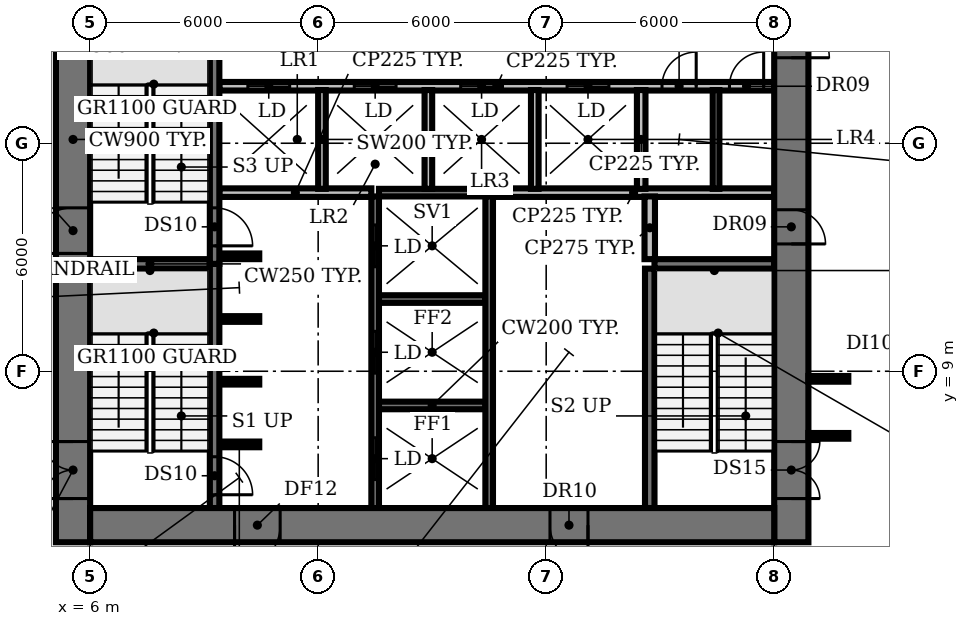
"""IFC4 building model, lengths in metres.
Left out: names, types, materials, properties, quantities, classifications, styles, units other than length and angle.
Written with IfcOpenShell. Run it as: python <this file> out.ifc"""

import sys

from ifc_helpers import new_model, si_unit, direction, frame, frame_2d, origin, place, context, subcontext, project, spatial, rectangle, extrude, element, fill, save


model = new_model("IFC4")
c1 = context("Model", 3, precision=1e-05, world=origin(), true_north=direction((0.0, 1.0)))
c2 = subcontext(c1, "Body", "Model", "MODEL_VIEW")
j1 = project(units=[si_unit("LENGTHUNIT", "METRE"), si_unit("PLANEANGLEUNIT", "RADIAN")], contexts=[c1])
p1 = place(None, origin())
s1 = spatial("IfcSite", under=j1, at=p1, CompositionType="ELEMENT")
p2 = place(p1, origin())
s2 = spatial("IfcBuilding", under=s1, at=p2, CompositionType="ELEMENT")
p3 = place(p2, frame((0.0, 0.0, 54.2)))
s3 = spatial("IfcBuildingStorey", under=s2, at=p3, CompositionType="ELEMENT", Elevation=54.2)
p4 = place(p3, frame((9.4, 7.075, 0.0), z_axis=(0.0, 0.0, 1.0), x_axis=(1.0, 0.0, 0.0)))
e1 = element("IfcWall", 1, at=p4, inside=s3, PredefinedType="SHEAR", context=c2, shape_type="SweptSolid", body=[
    extrude(rectangle(XDim=1.05, YDim=0.15, at=frame_2d((0.525, 0.0))), origin(), (0.0, 0.0, 1.0), 3.85),
])
p5 = place(p3, frame((13.6, 8.1, 0.0), z_axis=(0.0, 0.0, 1.0), x_axis=(1.0, 0.0, 0.0)))
e2 = element("IfcWall", 2, at=p5, inside=s3, PredefinedType="SHEAR", context=c2, shape_type="SweptSolid", body=[
    extrude(rectangle(XDim=2.8, YDim=0.2, at=frame_2d((1.4, 0.0))), origin(), (0.0, 0.0, 1.0), 3.85),
])
for number, where, z_axis, x_axis in (
    (3, (9.4, 8.725, 0.0), (0.0, 0.0, 1.0), (1.0, 0.0, 0.0)),
    (4, (9.4, 10.375, 0.0), (0.0, 0.0, 1.0), (1.0, 0.0, 0.0)),
):
    element("IfcWall", number, at=place(p3, frame(where, z_axis=z_axis, x_axis=x_axis)), inside=s3, PredefinedType="SHEAR", context=c2, shape_type="SweptSolid", body=[
        extrude(rectangle(XDim=1.05, YDim=0.15, at=frame_2d((0.525, 0.0))), origin(), (0.0, 0.0, 1.0), 3.85),
    ])
p6 = place(p3, frame((13.6, 10.9, 0.0), z_axis=(0.0, 0.0, 1.0), x_axis=(1.0, 0.0, 0.0)))
e5 = element("IfcWall", 5, at=p6, inside=s3, PredefinedType="SHEAR", context=c2, shape_type="SweptSolid", body=[
    extrude(rectangle(XDim=2.8, YDim=0.2, at=frame_2d((1.4, 0.0))), origin(), (0.0, 0.0, 1.0), 3.85),
])
for number, where, z_axis, x_axis in (
    (6, (6.0, 11.825, 0.0), (0.0, 0.0, 1.0), (1.0, 0.0, 0.0)),
    (7, (20.85, 11.825, 0.0), (0.0, 0.0, 1.0), (1.0, 0.0, 0.0)),
):
    element("IfcWall", number, at=place(p3, frame(where, z_axis=z_axis, x_axis=x_axis)), inside=s3, PredefinedType="SHEAR", context=c2, shape_type="SweptSolid", body=[
        extrude(rectangle(XDim=3.15, YDim=0.25, at=frame_2d((1.575, 0.0))), origin(), (0.0, 0.0, 1.0), 3.85),
    ])
p7 = place(p3, frame((9.4, 12.025, 0.0), z_axis=(0.0, 0.0, 1.0), x_axis=(1.0, 0.0, 0.0)))
e8 = element("IfcWall", 8, at=p7, inside=s3, PredefinedType="SHEAR", context=c2, shape_type="SweptSolid", body=[
    extrude(rectangle(XDim=1.05, YDim=0.15, at=frame_2d((0.525, 0.0))), origin(), (0.0, 0.0, 1.0), 3.85),
])
p8 = place(p3, frame((9.4, 13.7, 0.0), z_axis=(0.0, 0.0, 1.0), x_axis=(1.0, 0.0, 0.0)))
e9 = element("IfcWall", 9, at=p8, inside=s3, PredefinedType="PARTITIONING", context=c2, shape_type="SweptSolid", body=[
    extrude(rectangle(XDim=4.0, YDim=0.225, at=frame_2d((2.0, 0.0))), origin(), (0.0, 0.0, 1.0), 3.85),
])
p9 = place(p3, frame((13.6, 13.7, 0.0), z_axis=(0.0, 0.0, 1.0), x_axis=(1.0, 0.0, 0.0)))
e10 = element("IfcWall", 10, at=p9, inside=s3, PredefinedType="SHEAR", context=c2, shape_type="SweptSolid", body=[
    extrude(rectangle(XDim=2.8, YDim=0.2, at=frame_2d((1.4, 0.0))), origin(), (0.0, 0.0, 1.0), 3.85),
])
p10 = place(p3, frame((16.6, 13.7, 0.0), z_axis=(0.0, 0.0, 1.0), x_axis=(1.0, 0.0, 0.0)))
e11 = element("IfcWall", 11, at=p10, inside=s3, PredefinedType="PARTITIONING", context=c2, shape_type="SweptSolid", body=[
    extrude(rectangle(XDim=7.4, YDim=0.225, at=frame_2d((3.7, 0.0))), origin(), (0.0, 0.0, 1.0), 3.85),
])
p11 = place(p3, frame((9.4, 16.5, 0.0), z_axis=(0.0, 0.0, 1.0), x_axis=(1.0, 0.0, 0.0)))
e12 = element("IfcWall", 12, at=p11, inside=s3, PredefinedType="PARTITIONING", context=c2, shape_type="SweptSolid", body=[
    extrude(rectangle(XDim=14.6, YDim=0.225, at=frame_2d((7.3, 0.0))), origin(), (0.0, 0.0, 1.0), 3.85),
])
p12 = place(p11, frame((0.75, 0.0, 0.0)))
e13 = element("IfcOpeningElement", 13, at=p12, cuts=e12, PredefinedType="OPENING", context=c2, shape_type="SweptSolid", body=[
    extrude(rectangle(XDim=1.1, YDim=2.1, at=frame_2d((0.55, 1.05))), frame((0.0, 0.123, 0.0), z_axis=(0.0, -1.0, 0.0), x_axis=(1.0, 0.0, 0.0)), (0.0, 0.0, 1.0), 0.245),
])
p13 = place(p11, frame((3.55, 0.0, 0.0)))
e14 = element("IfcOpeningElement", 14, at=p13, cuts=e12, PredefinedType="OPENING", context=c2, shape_type="SweptSolid", body=[
    extrude(rectangle(XDim=1.1, YDim=2.1, at=frame_2d((0.55, 1.05))), frame((0.0, 0.123, 0.0), z_axis=(0.0, -1.0, 0.0), x_axis=(1.0, 0.0, 0.0)), (0.0, 0.0, 1.0), 0.245),
])
p14 = place(p11, frame((6.35, 0.0, 0.0)))
e15 = element("IfcOpeningElement", 15, at=p14, cuts=e12, PredefinedType="OPENING", context=c2, shape_type="SweptSolid", body=[
    extrude(rectangle(XDim=1.1, YDim=2.1, at=frame_2d((0.55, 1.05))), frame((0.0, 0.123, 0.0), z_axis=(0.0, -1.0, 0.0), x_axis=(1.0, 0.0, 0.0)), (0.0, 0.0, 1.0), 0.245),
])
p15 = place(p11, frame((9.15, 0.0, 0.0)))
e16 = element("IfcOpeningElement", 16, at=p15, cuts=e12, PredefinedType="OPENING", context=c2, shape_type="SweptSolid", body=[
    extrude(rectangle(XDim=1.1, YDim=2.1, at=frame_2d((0.55, 1.05))), frame((0.0, 0.123, 0.0), z_axis=(0.0, -1.0, 0.0), x_axis=(1.0, 0.0, 0.0)), (0.0, 0.0, 1.0), 0.245),
])
p16 = place(p11, frame((11.647, 0.0, 0.0)))
e17 = element("IfcOpeningElement", 17, at=p16, cuts=e12, PredefinedType="OPENING", context=c2, shape_type="SweptSolid", body=[
    extrude(rectangle(XDim=0.9, YDim=2.1, at=frame_2d((0.45, 1.05))), frame((0.0, 0.123, 0.0), z_axis=(0.0, -1.0, 0.0), x_axis=(1.0, 0.0, 0.0)), (0.0, 0.0, 1.0), 0.245),
])
p17 = place(p11, frame((13.423, 0.0, 0.0)))
e18 = element("IfcOpeningElement", 18, at=p17, cuts=e12, PredefinedType="OPENING", context=c2, shape_type="SweptSolid", body=[
    extrude(rectangle(XDim=0.9, YDim=2.1, at=frame_2d((0.45, 1.05))), frame((0.0, 0.123, 0.0), z_axis=(0.0, -1.0, 0.0), x_axis=(1.0, 0.0, 0.0)), (0.0, 0.0, 1.0), 0.245),
])
p18 = place(p3, frame((9.275, 11.825, 0.0), z_axis=(0.0, 0.0, 1.0), x_axis=(0.0, -1.0, 0.0)))
e19 = element("IfcWall", 19, at=p18, inside=s3, PredefinedType="SHEAR", context=c2, shape_type="SweptSolid", body=[
    extrude(rectangle(XDim=6.425, YDim=0.25, at=frame_2d((3.212, 0.0))), origin(), (0.0, 0.0, 1.0), 3.85),
])
p19 = place(p18, frame((5.075, 0.0, 0.0)))
e20 = element("IfcOpeningElement", 20, at=p19, cuts=e19, PredefinedType="OPENING", context=c2, shape_type="SweptSolid", body=[
    extrude(rectangle(XDim=1.0, YDim=2.1, at=frame_2d((0.5, 1.05))), frame((0.0, 0.135, 0.0), z_axis=(0.0, -1.0, 0.0), x_axis=(1.0, 0.0, 0.0)), (0.0, 0.0, 1.0), 0.27),
])
p20 = place(p3, frame((9.275, 18.375, 0.0), z_axis=(0.0, 0.0, 1.0), x_axis=(0.0, -1.0, 0.0)))
e21 = element("IfcWall", 21, at=p20, inside=s3, PredefinedType="SHEAR", context=c2, shape_type="SweptSolid", body=[
    extrude(rectangle(XDim=6.55, YDim=0.25, at=frame_2d((3.275, 0.0))), origin(), (0.0, 0.0, 1.0), 3.85),
])
p21 = place(p20, frame((5.075, 0.0, 0.0)))
e22 = element("IfcOpeningElement", 22, at=p21, cuts=e21, PredefinedType="OPENING", context=c2, shape_type="SweptSolid", body=[
    extrude(rectangle(XDim=1.0, YDim=2.1, at=frame_2d((0.5, 1.05))), frame((0.0, 0.135, 0.0), z_axis=(0.0, -1.0, 0.0), x_axis=(1.0, 0.0, 0.0)), (0.0, 0.0, 1.0), 0.27),
])
p22 = place(p3, frame((12.1, 13.8, 0.0), z_axis=(0.0, 0.0, 1.0), x_axis=(0.0, 1.0, 0.0)))
e23 = element("IfcWall", 23, at=p22, inside=s3, PredefinedType="SOLIDWALL", context=c2, shape_type="SweptSolid", body=[
    extrude(rectangle(XDim=2.6, YDim=0.2, at=frame_2d((1.3, 0.0))), origin(), (0.0, 0.0, 1.0), 3.85),
])
p23 = place(p3, frame((13.5, 5.4, 0.0), z_axis=(0.0, 0.0, 1.0), x_axis=(0.0, 1.0, 0.0)))
e24 = element("IfcWall", 24, at=p23, inside=s3, PredefinedType="SHEAR", context=c2, shape_type="SweptSolid", body=[
    extrude(rectangle(XDim=8.2, YDim=0.2, at=frame_2d((4.1, 0.0))), origin(), (0.0, 0.0, 1.0), 3.85),
])
p24 = place(p23, frame((0.75, 0.0, 0.0)))
e25 = element("IfcOpeningElement", 25, at=p24, cuts=e24, PredefinedType="OPENING", context=c2, shape_type="SweptSolid", body=[
    extrude(rectangle(XDim=1.1, YDim=2.1, at=frame_2d((0.55, 1.05))), frame((0.0, 0.11, 0.0), z_axis=(0.0, -1.0, 0.0), x_axis=(1.0, 0.0, 0.0)), (0.0, 0.0, 1.0), 0.22),
])
p25 = place(p23, frame((3.55, 0.0, 0.0)))
e26 = element("IfcOpeningElement", 26, at=p25, cuts=e24, PredefinedType="OPENING", context=c2, shape_type="SweptSolid", body=[
    extrude(rectangle(XDim=1.1, YDim=2.1, at=frame_2d((0.55, 1.05))), frame((0.0, 0.11, 0.0), z_axis=(0.0, -1.0, 0.0), x_axis=(1.0, 0.0, 0.0)), (0.0, 0.0, 1.0), 0.22),
])
p26 = place(p23, frame((6.35, 0.0, 0.0)))
e27 = element("IfcOpeningElement", 27, at=p26, cuts=e24, PredefinedType="OPENING", context=c2, shape_type="SweptSolid", body=[
    extrude(rectangle(XDim=1.1, YDim=2.1, at=frame_2d((0.55, 1.05))), frame((0.0, 0.11, 0.0), z_axis=(0.0, -1.0, 0.0), x_axis=(1.0, 0.0, 0.0)), (0.0, 0.0, 1.0), 0.22),
])
p27 = place(p3, frame((14.9, 13.8, 0.0), z_axis=(0.0, 0.0, 1.0), x_axis=(0.0, 1.0, 0.0)))
e28 = element("IfcWall", 28, at=p27, inside=s3, PredefinedType="SOLIDWALL", context=c2, shape_type="SweptSolid", body=[
    extrude(rectangle(XDim=2.6, YDim=0.2, at=frame_2d((1.3, 0.0))), origin(), (0.0, 0.0, 1.0), 3.85),
])
p28 = place(p3, frame((16.5, 5.4, 0.0), z_axis=(0.0, 0.0, 1.0), x_axis=(0.0, 1.0, 0.0)))
e29 = element("IfcWall", 29, at=p28, inside=s3, PredefinedType="SHEAR", context=c2, shape_type="SweptSolid", body=[
    extrude(rectangle(XDim=8.2, YDim=0.2, at=frame_2d((4.1, 0.0))), origin(), (0.0, 0.0, 1.0), 3.85),
])
p29 = place(p3, frame((17.7, 13.8, 0.0), z_axis=(0.0, 0.0, 1.0), x_axis=(0.0, 1.0, 0.0)))
e30 = element("IfcWall", 30, at=p29, inside=s3, PredefinedType="SOLIDWALL", context=c2, shape_type="SweptSolid", body=[
    extrude(rectangle(XDim=2.6, YDim=0.2, at=frame_2d((1.3, 0.0))), origin(), (0.0, 0.0, 1.0), 3.85),
])
p30 = place(p3, frame((20.5, 13.8, 0.0), z_axis=(0.0, 0.0, 1.0), x_axis=(0.0, 1.0, 0.0)))
e31 = element("IfcWall", 31, at=p30, inside=s3, PredefinedType="PARTITIONING", context=c2, shape_type="SweptSolid", body=[
    extrude(rectangle(XDim=2.6, YDim=0.225, at=frame_2d((1.3, 0.0))), origin(), (0.0, 0.0, 1.0), 3.85),
])
p31 = place(p3, frame((20.725, 5.4, 0.0), z_axis=(0.0, 0.0, 1.0), x_axis=(0.0, 1.0, 0.0)))
e32 = element("IfcWall", 32, at=p31, inside=s3, PredefinedType="SHEAR", context=c2, shape_type="SweptSolid", body=[
    extrude(rectangle(XDim=6.3, YDim=0.25, at=frame_2d((3.15, 0.0))), origin(), (0.0, 0.0, 1.0), 3.85),
])
p32 = place(p3, frame((20.725, 11.95, 0.0), z_axis=(0.0, 0.0, 1.0), x_axis=(0.0, 1.0, 0.0)))
e33 = element("IfcWall", 33, at=p32, inside=s3, PredefinedType="PARTITIONING", context=c2, shape_type="SweptSolid", body=[
    extrude(rectangle(XDim=1.65, YDim=0.275, at=frame_2d((0.825, 0.0))), origin(), (0.0, 0.0, 1.0), 3.85),
])
p33 = place(p3, frame((22.47, 13.8, 0.0), z_axis=(0.0, 0.0, 1.0), x_axis=(0.0, 1.0, 0.0)))
e34 = element("IfcWall", 34, at=p33, inside=s3, PredefinedType="PARTITIONING", context=c2, shape_type="SweptSolid", body=[
    extrude(rectangle(XDim=2.6, YDim=0.175, at=frame_2d((1.3, 0.0))), origin(), (0.0, 0.0, 1.0), 3.85),
])
p34 = place(p3, frame((5.55, 4.5, 0.0), z_axis=(0.0, 0.0, 1.0), x_axis=(0.0, 1.0, 0.0)))
e35 = element("IfcWall", 35, at=p34, inside=s3, PredefinedType="SHEAR", context=c2, shape_type="SweptSolid", body=[
    extrude(rectangle(XDim=21.2, YDim=0.9, at=frame_2d((10.6, 0.0))), origin(), (0.0, 0.0, 1.0), 3.85),
])
p35 = place(p34, frame((1.15, 0.0, 0.0)))
e36 = element("IfcOpeningElement", 36, at=p35, cuts=e35, PredefinedType="OPENING", context=c2, shape_type="SweptSolid", body=[
    extrude(rectangle(XDim=1.5, YDim=2.1, at=frame_2d((0.75, 1.05))), frame((0.0, 0.46, 0.0), z_axis=(0.0, -1.0, 0.0), x_axis=(1.0, 0.0, 0.0)), (0.0, 0.0, 1.0), 0.92),
])
p36 = place(p34, frame((7.6, 0.0, 0.0)))
e37 = element("IfcOpeningElement", 37, at=p36, cuts=e35, PredefinedType="OPENING", context=c2, shape_type="SweptSolid", body=[
    extrude(rectangle(XDim=1.2, YDim=2.1, at=frame_2d((0.6, 1.05))), frame((0.0, 0.46, 0.0), z_axis=(0.0, -1.0, 0.0), x_axis=(1.0, 0.0, 0.0)), (0.0, 0.0, 1.0), 0.92),
])
p37 = place(p34, frame((14.15, 0.0, 0.0)))
e38 = element("IfcOpeningElement", 38, at=p37, cuts=e35, PredefinedType="OPENING", context=c2, shape_type="SweptSolid", body=[
    extrude(rectangle(XDim=1.2, YDim=2.1, at=frame_2d((0.6, 1.05))), frame((0.0, 0.46, 0.0), z_axis=(0.0, -1.0, 0.0), x_axis=(1.0, 0.0, 0.0)), (0.0, 0.0, 1.0), 0.92),
])
p38 = place(p3, frame((24.45, 25.7, 0.0), z_axis=(0.0, 0.0, 1.0), x_axis=(0.0, -1.0, 0.0)))
e39 = element("IfcWall", 39, at=p38, inside=s3, PredefinedType="SHEAR", context=c2, shape_type="SweptSolid", body=[
    extrude(rectangle(XDim=21.2, YDim=0.9, at=frame_2d((10.6, 0.0))), origin(), (0.0, 0.0, 1.0), 3.85),
])
p39 = place(p38, frame((18.55, 0.0, 0.0)))
e40 = element("IfcOpeningElement", 40, at=p39, cuts=e39, PredefinedType="OPENING", context=c2, shape_type="SweptSolid", body=[
    extrude(rectangle(XDim=1.5, YDim=2.1, at=frame_2d((0.75, 1.05))), frame((0.0, 0.46, 0.0), z_axis=(0.0, -1.0, 0.0), x_axis=(1.0, 0.0, 0.0)), (0.0, 0.0, 1.0), 0.92),
])
p40 = place(p38, frame((12.45, 0.0, 0.0)))
e41 = element("IfcOpeningElement", 41, at=p40, cuts=e39, PredefinedType="OPENING", context=c2, shape_type="SweptSolid", body=[
    extrude(rectangle(XDim=0.9, YDim=2.1, at=frame_2d((0.45, 1.05))), frame((0.0, 0.46, 0.0), z_axis=(0.0, -1.0, 0.0), x_axis=(1.0, 0.0, 0.0)), (0.0, 0.0, 1.0), 0.92),
])
p41 = place(p38, frame((6.45, 0.0, 0.0)))
e42 = element("IfcOpeningElement", 42, at=p41, cuts=e39, PredefinedType="OPENING", context=c2, shape_type="SweptSolid", body=[
    extrude(rectangle(XDim=2.0, YDim=2.1, at=frame_2d((1.0, 1.05))), frame((0.0, 0.46, 0.0), z_axis=(0.0, -1.0, 0.0), x_axis=(1.0, 0.0, 0.0)), (0.0, 0.0, 1.0), 0.92),
])
p42 = place(p3, frame((24.0, 4.95, 0.0), z_axis=(0.0, 0.0, 1.0), x_axis=(-1.0, 0.0, 0.0)))
e43 = element("IfcWall", 43, at=p42, inside=s3, PredefinedType="SHEAR", context=c2, shape_type="SweptSolid", body=[
    extrude(rectangle(XDim=18.0, YDim=0.9, at=frame_2d((9.0, 0.0))), origin(), (0.0, 0.0, 1.0), 3.85),
])
p43 = place(p42, frame((13.0, 0.0, 0.0)))
e44 = element("IfcOpeningElement", 44, at=p43, cuts=e43, PredefinedType="OPENING", context=c2, shape_type="SweptSolid", body=[
    extrude(rectangle(XDim=1.2, YDim=2.1, at=frame_2d((0.6, 1.05))), frame((0.0, 0.46, 0.0), z_axis=(0.0, -1.0, 0.0), x_axis=(1.0, 0.0, 0.0)), (0.0, 0.0, 1.0), 0.92),
])
p44 = place(p42, frame((4.9, 0.0, 0.0)))
e45 = element("IfcOpeningElement", 45, at=p44, cuts=e43, PredefinedType="OPENING", context=c2, shape_type="SweptSolid", body=[
    extrude(rectangle(XDim=1.0, YDim=2.1, at=frame_2d((0.5, 1.05))), frame((0.0, 0.46, 0.0), z_axis=(0.0, -1.0, 0.0), x_axis=(1.0, 0.0, 0.0)), (0.0, 0.0, 1.0), 0.92),
])
for number, where, z_axis, x_axis in (
    (46, (24.9, 7.3, 0.0), (0.0, 0.0, 1.0), (1.0, 0.0, 0.0)),
    (47, (24.9, 8.8, 0.0), (0.0, 0.0, 1.0), (1.0, 0.0, 0.0)),
):
    element("IfcWall", number, at=place(p3, frame(where, z_axis=z_axis, x_axis=x_axis)), inside=s3, PredefinedType="PARTITIONING", context=c2, shape_type="SweptSolid", body=[
        extrude(rectangle(XDim=1.05, YDim=0.15, at=frame_2d((0.525, 0.0))), origin(), (0.0, 0.0, 1.0), 2.83),
    ])
p45 = place(p12, origin())
e48 = element("IfcDoor", 48, at=p45, inside=s3, OperationType="DOUBLE_DOOR_SLIDING", PredefinedType="DOOR", context=c2, shape_type="SweptSolid", body=[
    extrude(rectangle(XDim=1.1, YDim=2.1, at=frame_2d((0.55, 1.05))), frame((0.0, 0.025, 0.0), z_axis=(0.0, -1.0, 0.0), x_axis=(1.0, 0.0, 0.0)), (0.0, 0.0, 1.0), 0.05),
])
fill(e13, e48)
p46 = place(p13, origin())
e49 = element("IfcDoor", 49, at=p46, inside=s3, OperationType="DOUBLE_DOOR_SLIDING", PredefinedType="DOOR", context=c2, shape_type="SweptSolid", body=[
    extrude(rectangle(XDim=1.1, YDim=2.1, at=frame_2d((0.55, 1.05))), frame((0.0, 0.025, 0.0), z_axis=(0.0, -1.0, 0.0), x_axis=(1.0, 0.0, 0.0)), (0.0, 0.0, 1.0), 0.05),
])
fill(e14, e49)
p47 = place(p14, origin())
e50 = element("IfcDoor", 50, at=p47, inside=s3, OperationType="DOUBLE_DOOR_SLIDING", PredefinedType="DOOR", context=c2, shape_type="SweptSolid", body=[
    extrude(rectangle(XDim=1.1, YDim=2.1, at=frame_2d((0.55, 1.05))), frame((0.0, 0.025, 0.0), z_axis=(0.0, -1.0, 0.0), x_axis=(1.0, 0.0, 0.0)), (0.0, 0.0, 1.0), 0.05),
])
fill(e15, e50)
p48 = place(p15, origin())
e51 = element("IfcDoor", 51, at=p48, inside=s3, OperationType="DOUBLE_DOOR_SLIDING", PredefinedType="DOOR", context=c2, shape_type="SweptSolid", body=[
    extrude(rectangle(XDim=1.1, YDim=2.1, at=frame_2d((0.55, 1.05))), frame((0.0, 0.025, 0.0), z_axis=(0.0, -1.0, 0.0), x_axis=(1.0, 0.0, 0.0)), (0.0, 0.0, 1.0), 0.05),
])
fill(e16, e51)
p49 = place(p16, origin())
e52 = element("IfcDoor", 52, at=p49, inside=s3, OperationType="SINGLE_SWING_RIGHT", PredefinedType="DOOR", context=c2, shape_type="SweptSolid", body=[
    extrude(rectangle(XDim=0.9, YDim=2.1, at=frame_2d((0.45, 1.05))), frame((0.0, 0.025, 0.0), z_axis=(0.0, -1.0, 0.0), x_axis=(1.0, 0.0, 0.0)), (0.0, 0.0, 1.0), 0.05),
])
fill(e17, e52)
p50 = place(p17, origin())
e53 = element("IfcDoor", 53, at=p50, inside=s3, OperationType="SINGLE_SWING_RIGHT", PredefinedType="DOOR", context=c2, shape_type="SweptSolid", body=[
    extrude(rectangle(XDim=0.9, YDim=2.1, at=frame_2d((0.45, 1.05))), frame((0.0, 0.025, 0.0), z_axis=(0.0, -1.0, 0.0), x_axis=(1.0, 0.0, 0.0)), (0.0, 0.0, 1.0), 0.05),
])
fill(e18, e53)
p51 = place(p19, origin())
e54 = element("IfcDoor", 54, at=p51, inside=s3, OperationType="SINGLE_SWING_RIGHT", PredefinedType="DOOR", context=c2, shape_type="SweptSolid", body=[
    extrude(rectangle(XDim=1.0, YDim=2.1, at=frame_2d((0.5, 1.05))), frame((0.0, 0.025, 0.0), z_axis=(0.0, -1.0, 0.0), x_axis=(1.0, 0.0, 0.0)), (0.0, 0.0, 1.0), 0.05),
])
fill(e20, e54)
p52 = place(p21, origin())
e55 = element("IfcDoor", 55, at=p52, inside=s3, OperationType="SINGLE_SWING_RIGHT", PredefinedType="DOOR", context=c2, shape_type="SweptSolid", body=[
    extrude(rectangle(XDim=1.0, YDim=2.1, at=frame_2d((0.5, 1.05))), frame((0.0, 0.025, 0.0), z_axis=(0.0, -1.0, 0.0), x_axis=(1.0, 0.0, 0.0)), (0.0, 0.0, 1.0), 0.05),
])
fill(e22, e55)
p53 = place(p24, origin())
e56 = element("IfcDoor", 56, at=p53, inside=s3, OperationType="DOUBLE_DOOR_SLIDING", PredefinedType="DOOR", context=c2, shape_type="SweptSolid", body=[
    extrude(rectangle(XDim=1.1, YDim=2.1, at=frame_2d((0.55, 1.05))), frame((0.0, 0.025, 0.0), z_axis=(0.0, -1.0, 0.0), x_axis=(1.0, 0.0, 0.0)), (0.0, 0.0, 1.0), 0.05),
])
fill(e25, e56)
p54 = place(p25, origin())
e57 = element("IfcDoor", 57, at=p54, inside=s3, OperationType="DOUBLE_DOOR_SLIDING", PredefinedType="DOOR", context=c2, shape_type="SweptSolid", body=[
    extrude(rectangle(XDim=1.1, YDim=2.1, at=frame_2d((0.55, 1.05))), frame((0.0, 0.025, 0.0), z_axis=(0.0, -1.0, 0.0), x_axis=(1.0, 0.0, 0.0)), (0.0, 0.0, 1.0), 0.05),
])
fill(e26, e57)
p55 = place(p26, origin())
e58 = element("IfcDoor", 58, at=p55, inside=s3, OperationType="DOUBLE_DOOR_SLIDING", PredefinedType="DOOR", context=c2, shape_type="SweptSolid", body=[
    extrude(rectangle(XDim=1.1, YDim=2.1, at=frame_2d((0.55, 1.05))), frame((0.0, 0.025, 0.0), z_axis=(0.0, -1.0, 0.0), x_axis=(1.0, 0.0, 0.0)), (0.0, 0.0, 1.0), 0.05),
])
fill(e27, e58)
p56 = place(p35, origin())
e59 = element("IfcDoor", 59, at=p56, inside=s3, OperationType="DOUBLE_DOOR_SINGLE_SWING", PredefinedType="DOOR", context=c2, shape_type="SweptSolid", body=[
    extrude(rectangle(XDim=1.5, YDim=2.1, at=frame_2d((0.75, 1.05))), frame((0.0, 0.025, 0.0), z_axis=(0.0, -1.0, 0.0), x_axis=(1.0, 0.0, 0.0)), (0.0, 0.0, 1.0), 0.05),
])
fill(e36, e59)
p57 = place(p36, origin())
e60 = element("IfcDoor", 60, at=p57, inside=s3, OperationType="SINGLE_SWING_LEFT", PredefinedType="DOOR", context=c2, shape_type="SweptSolid", body=[
    extrude(rectangle(XDim=1.2, YDim=2.1, at=frame_2d((0.6, 1.05))), frame((0.0, 0.025, 0.0), z_axis=(0.0, -1.0, 0.0), x_axis=(1.0, 0.0, 0.0)), (0.0, 0.0, 1.0), 0.05),
])
fill(e37, e60)
p58 = place(p39, origin())
e61 = element("IfcDoor", 61, at=p58, inside=s3, OperationType="DOUBLE_DOOR_SINGLE_SWING", PredefinedType="DOOR", context=c2, shape_type="SweptSolid", body=[
    extrude(rectangle(XDim=1.5, YDim=2.1, at=frame_2d((0.75, 1.05))), frame((0.0, 0.025, 0.0), z_axis=(0.0, -1.0, 0.0), x_axis=(1.0, 0.0, 0.0)), (0.0, 0.0, 1.0), 0.05),
])
fill(e40, e61)
p59 = place(p40, origin())
e62 = element("IfcDoor", 62, at=p59, inside=s3, OperationType="SINGLE_SWING_RIGHT", PredefinedType="DOOR", context=c2, shape_type="SweptSolid", body=[
    extrude(rectangle(XDim=0.9, YDim=2.1, at=frame_2d((0.45, 1.05))), frame((0.0, -0.39, 0.0), z_axis=(0.0, -1.0, 0.0), x_axis=(1.0, 0.0, 0.0)), (0.0, 0.0, 1.0), 0.05),
])
fill(e41, e62)
p60 = place(p41, origin())
e63 = element("IfcDoor", 63, at=p60, inside=s3, OperationType="DOUBLE_DOOR_SINGLE_SWING", PredefinedType="DOOR", context=c2, shape_type="SweptSolid", body=[
    extrude(rectangle(XDim=2.0, YDim=2.1, at=frame_2d((1.0, 1.05))), frame((0.0, 0.025, 0.0), z_axis=(0.0, -1.0, 0.0), x_axis=(1.0, 0.0, 0.0)), (0.0, 0.0, 1.0), 0.05),
])
fill(e42, e63)
p61 = place(p43, origin())
e64 = element("IfcDoor", 64, at=p61, inside=s3, OperationType="SINGLE_SWING_RIGHT", PredefinedType="DOOR", context=c2, shape_type="SweptSolid", body=[
    extrude(rectangle(XDim=1.2, YDim=2.1, at=frame_2d((0.6, 1.05))), frame((0.0, 0.025, 0.0), z_axis=(0.0, -1.0, 0.0), x_axis=(1.0, 0.0, 0.0)), (0.0, 0.0, 1.0), 0.05),
])
fill(e44, e64)
p62 = place(p44, origin())
e65 = element("IfcDoor", 65, at=p62, inside=s3, OperationType="SINGLE_SWING_LEFT", PredefinedType="DOOR", context=c2, shape_type="SweptSolid", body=[
    extrude(rectangle(XDim=1.0, YDim=2.1, at=frame_2d((0.5, 1.05))), frame((0.0, -0.39, 0.0), z_axis=(0.0, -1.0, 0.0), x_axis=(1.0, 0.0, 0.0)), (0.0, 0.0, 1.0), 0.05),
])
fill(e45, e65)
save(model, sys.argv[1])
